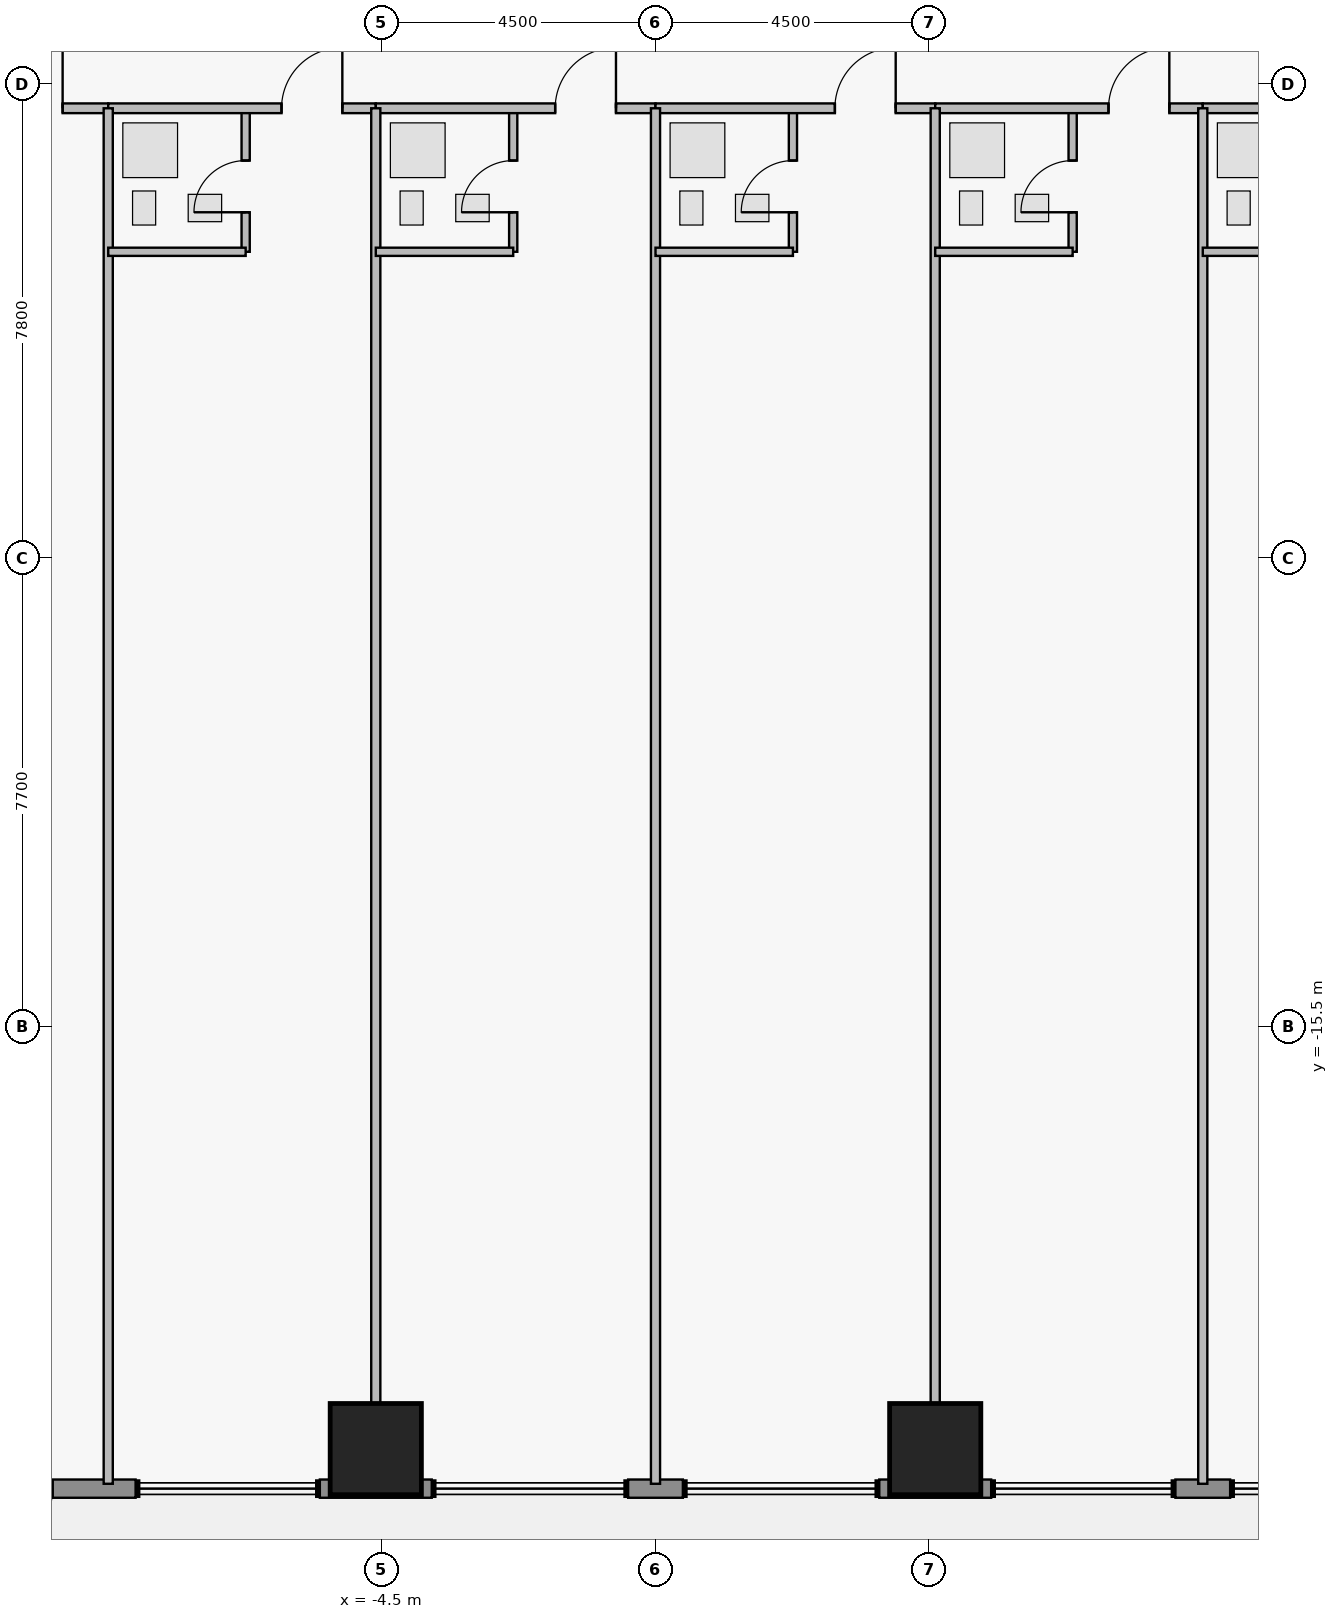
"""IFC4 building model, lengths in metres.
Left out: names, types, materials, properties, quantities, classifications, styles, units other than length and angle.
Written with IfcOpenShell. Run it as: python <this file> out.ifc"""

import sys

from ifc_helpers import new_model, si_unit, direction, frame, frame_2d, origin, origin_2d, place, context, subcontext, project, spatial, rectangle, extrude, element, fill, save


model = new_model("IFC4")
c1 = context("Model", 3, precision=1e-05, world=origin(), true_north=direction((0.0, 1.0)))
c2 = subcontext(c1, "Body", "Model", "MODEL_VIEW")
j1 = project(units=[si_unit("LENGTHUNIT", "METRE"), si_unit("PLANEANGLEUNIT", "RADIAN")], contexts=[c1])
p1 = place(None, origin())
s1 = spatial("IfcSite", under=j1, at=p1, CompositionType="ELEMENT")
p2 = place(p1, origin())
s2 = spatial("IfcBuilding", under=s1, at=p2, CompositionType="ELEMENT")
p3 = place(p2, frame((0.0, 0.0, 60.45)))
s3 = spatial("IfcBuildingStorey", under=s2, at=p3, CompositionType="ELEMENT", Elevation=60.45)
for number, where, z_axis, x_axis in (
    (1, (-4.6, -22.45, 0.0), (0.0, 0.0, 1.0), (1.0, 0.0, 0.0)),
    (2, (4.6, -22.45, 0.0), (0.0, 0.0, 1.0), (1.0, 0.0, 0.0)),
):
    element("IfcColumn", number, at=place(p3, frame(where, z_axis=z_axis, x_axis=x_axis)), inside=s3, PredefinedType="COLUMN", context=c2, shape_type="SweptSolid", body=[
        extrude(rectangle(XDim=1.5, YDim=1.5, at=origin_2d()), origin(), (0.0, 0.0, 1.0), 3.65),
    ])
p4 = place(p3, frame((9.45, -23.1, 0.0), z_axis=(0.0, 0.0, 1.0), x_axis=(-1.0, 0.0, 0.0)))
e3 = element("IfcWall", 3, at=p4, inside=s3, PredefinedType="STANDARD", context=c2, shape_type="SweptSolid", body=[
    extrude(rectangle(XDim=0.9, YDim=0.3, at=frame_2d((0.45, 0.0))), origin(), (0.0, 0.0, 1.0), 3.43),
])
p5 = place(p3, frame((5.52, -23.1, 0.0), z_axis=(0.0, 0.0, 1.0), x_axis=(-1.0, 0.0, 0.0)))
e4 = element("IfcWall", 4, at=p5, inside=s3, PredefinedType="STANDARD", context=c2, shape_type="SweptSolid", body=[
    extrude(rectangle(XDim=1.84, YDim=0.3, at=frame_2d((0.92, 0.0))), origin(), (0.0, 0.0, 1.0), 3.43),
])
p6 = place(p3, frame((0.45, -23.1, 0.0), z_axis=(0.0, 0.0, 1.0), x_axis=(-1.0, 0.0, 0.0)))
e5 = element("IfcWall", 5, at=p6, inside=s3, PredefinedType="STANDARD", context=c2, shape_type="SweptSolid", body=[
    extrude(rectangle(XDim=0.9, YDim=0.3, at=frame_2d((0.45, 0.0))), origin(), (0.0, 0.0, 1.0), 3.43),
])
p7 = place(p3, frame((-3.68, -23.1, 0.0), z_axis=(0.0, 0.0, 1.0), x_axis=(-1.0, 0.0, 0.0)))
e6 = element("IfcWall", 6, at=p7, inside=s3, PredefinedType="STANDARD", context=c2, shape_type="SweptSolid", body=[
    extrude(rectangle(XDim=1.84, YDim=0.3, at=frame_2d((0.92, 0.0))), origin(), (0.0, 0.0, 1.0), 3.43),
])
p8 = place(p3, frame((-8.55, -23.1, 0.0), z_axis=(0.0, 0.0, 1.0), x_axis=(-1.0, 0.0, 0.0)))
e7 = element("IfcWall", 7, at=p8, inside=s3, PredefinedType="STANDARD", context=c2, shape_type="SweptSolid", body=[
    extrude(rectangle(XDim=6.17, YDim=0.3, at=frame_2d((3.085, 0.0))), origin(), (0.0, 0.0, 1.0), 3.43),
])
p9 = place(p8, frame((1.365, 0.0, 0.0)))
e8 = element("IfcOpeningElement", 8, at=p9, cuts=e7, PredefinedType="OPENING", context=c2, shape_type="SweptSolid", body=[
    extrude(rectangle(XDim=1.05, YDim=2.2, at=frame_2d((0.525, 1.1))), frame((0.0, 0.16, 0.0), z_axis=(0.0, -1.0, 0.0), x_axis=(1.0, 0.0, 0.0)), (0.0, 0.0, 1.0), 0.32),
])
p10 = place(p8, frame((3.032, 0.0, 0.95)))
e9 = element("IfcOpeningElement", 9, at=p10, cuts=e7, PredefinedType="OPENING", context=c2, shape_type="SweptSolid", body=[
    extrude(rectangle(XDim=1.15, YDim=1.55, at=frame_2d((0.575, 0.775))), frame((0.0, 0.16, 0.0), z_axis=(0.0, -1.0, 0.0), x_axis=(1.0, 0.0, 0.0)), (0.0, 0.0, 1.0), 0.32),
])
p11 = place(p3, frame((-13.8, -0.4, 0.0), z_axis=(0.0, 0.0, 1.0), x_axis=(1.0, 0.0, 0.0)))
e10 = element("IfcWall", 10, at=p11, inside=s3, PredefinedType="PARTITIONING", context=c2, shape_type="SweptSolid", body=[
    extrude(rectangle(XDim=4.8, YDim=0.16, at=frame_2d((2.4, 0.0))), origin(), (0.0, 0.0, 1.0), 3.43),
])
p12 = place(p11, frame((3.05, 0.0, 0.0)))
e11 = element("IfcOpeningElement", 11, at=p12, cuts=e10, PredefinedType="OPENING", context=c2, shape_type="SweptSolid", body=[
    extrude(rectangle(XDim=1.0, YDim=2.15, at=frame_2d((0.5, 1.075))), frame((0.0, 0.09, 0.0), z_axis=(0.0, -1.0, 0.0), x_axis=(1.0, 0.0, 0.0)), (0.0, 0.0, 1.0), 0.18),
])
p13 = place(p3, frame((-6.74, -2.76, 0.0), z_axis=(0.0, 0.0, 1.0), x_axis=(0.0, 1.0, 0.0)))
e12 = element("IfcWall", 12, at=p13, inside=s3, PredefinedType="PLUMBINGWALL", context=c2, shape_type="SweptSolid", body=[
    extrude(rectangle(XDim=2.36, YDim=0.135, at=frame_2d((1.18, 0.0))), origin(), (0.0, 0.0, 1.0), 3.43),
])
p14 = place(p13, frame((0.65, 0.0, 0.0)))
e13 = element("IfcOpeningElement", 13, at=p14, cuts=e12, PredefinedType="OPENING", context=c2, shape_type="SweptSolid", body=[
    extrude(rectangle(XDim=0.85, YDim=2.1, at=frame_2d((0.425, 1.05))), frame((0.0, 0.077, 0.0), z_axis=(0.0, -1.0, 0.0), x_axis=(1.0, 0.0, 0.0)), (0.0, 0.0, 1.0), 0.155),
])
p15 = place(p3, frame((-9.0, -0.4, 0.0), z_axis=(0.0, 0.0, 1.0), x_axis=(1.0, 0.0, 0.0)))
e14 = element("IfcWall", 14, at=p15, inside=s3, PredefinedType="PARTITIONING", context=c2, shape_type="SweptSolid", body=[
    extrude(rectangle(XDim=4.4, YDim=0.16, at=frame_2d((2.2, 0.0))), origin(), (0.0, 0.0, 1.0), 3.43),
])
p16 = place(p15, frame((2.85, 0.0, 0.0)))
e15 = element("IfcOpeningElement", 15, at=p16, cuts=e14, PredefinedType="OPENING", context=c2, shape_type="SweptSolid", body=[
    extrude(rectangle(XDim=1.0, YDim=2.15, at=frame_2d((0.5, 1.075))), frame((0.0, 0.09, 0.0), z_axis=(0.0, -1.0, 0.0), x_axis=(1.0, 0.0, 0.0)), (0.0, 0.0, 1.0), 0.18),
])
p17 = place(p3, frame((-2.34, -2.76, 0.0), z_axis=(0.0, 0.0, 1.0), x_axis=(0.0, 1.0, 0.0)))
e16 = element("IfcWall", 16, at=p17, inside=s3, PredefinedType="PLUMBINGWALL", context=c2, shape_type="SweptSolid", body=[
    extrude(rectangle(XDim=2.36, YDim=0.135, at=frame_2d((1.18, 0.0))), origin(), (0.0, 0.0, 1.0), 3.43),
])
p18 = place(p17, frame((0.65, 0.0, 0.0)))
e17 = element("IfcOpeningElement", 17, at=p18, cuts=e16, PredefinedType="OPENING", context=c2, shape_type="SweptSolid", body=[
    extrude(rectangle(XDim=0.85, YDim=2.1, at=frame_2d((0.425, 1.05))), frame((0.0, 0.077, 0.0), z_axis=(0.0, -1.0, 0.0), x_axis=(1.0, 0.0, 0.0)), (0.0, 0.0, 1.0), 0.155),
])
p19 = place(p3, frame((-4.6, -0.4, 0.0), z_axis=(0.0, 0.0, 1.0), x_axis=(1.0, 0.0, 0.0)))
e18 = element("IfcWall", 18, at=p19, inside=s3, PredefinedType="PARTITIONING", context=c2, shape_type="SweptSolid", body=[
    extrude(rectangle(XDim=4.6, YDim=0.16, at=frame_2d((2.3, 0.0))), origin(), (0.0, 0.0, 1.0), 3.43),
])
p20 = place(p19, frame((2.95, 0.0, 0.0)))
e19 = element("IfcOpeningElement", 19, at=p20, cuts=e18, PredefinedType="OPENING", context=c2, shape_type="SweptSolid", body=[
    extrude(rectangle(XDim=1.0, YDim=2.15, at=frame_2d((0.5, 1.075))), frame((0.0, 0.09, 0.0), z_axis=(0.0, -1.0, 0.0), x_axis=(1.0, 0.0, 0.0)), (0.0, 0.0, 1.0), 0.18),
])
p21 = place(p3, frame((2.26, -2.76, 0.0), z_axis=(0.0, 0.0, 1.0), x_axis=(0.0, 1.0, 0.0)))
e20 = element("IfcWall", 20, at=p21, inside=s3, PredefinedType="PLUMBINGWALL", context=c2, shape_type="SweptSolid", body=[
    extrude(rectangle(XDim=2.36, YDim=0.135, at=frame_2d((1.18, 0.0))), origin(), (0.0, 0.0, 1.0), 3.43),
])
p22 = place(p21, frame((0.65, 0.0, 0.0)))
e21 = element("IfcOpeningElement", 21, at=p22, cuts=e20, PredefinedType="OPENING", context=c2, shape_type="SweptSolid", body=[
    extrude(rectangle(XDim=0.85, YDim=2.1, at=frame_2d((0.425, 1.05))), frame((0.0, 0.077, 0.0), z_axis=(0.0, -1.0, 0.0), x_axis=(1.0, 0.0, 0.0)), (0.0, 0.0, 1.0), 0.155),
])
p23 = place(p3, frame((0.0, -0.4, 0.0), z_axis=(0.0, 0.0, 1.0), x_axis=(1.0, 0.0, 0.0)))
e22 = element("IfcWall", 22, at=p23, inside=s3, PredefinedType="PARTITIONING", context=c2, shape_type="SweptSolid", body=[
    extrude(rectangle(XDim=4.6, YDim=0.16, at=frame_2d((2.3, 0.0))), origin(), (0.0, 0.0, 1.0), 3.43),
])
p24 = place(p23, frame((2.95, 0.0, 0.0)))
e23 = element("IfcOpeningElement", 23, at=p24, cuts=e22, PredefinedType="OPENING", context=c2, shape_type="SweptSolid", body=[
    extrude(rectangle(XDim=1.0, YDim=2.15, at=frame_2d((0.5, 1.075))), frame((0.0, 0.09, 0.0), z_axis=(0.0, -1.0, 0.0), x_axis=(1.0, 0.0, 0.0)), (0.0, 0.0, 1.0), 0.18),
])
p25 = place(p3, frame((6.86, -2.76, 0.0), z_axis=(0.0, 0.0, 1.0), x_axis=(0.0, 1.0, 0.0)))
e24 = element("IfcWall", 24, at=p25, inside=s3, PredefinedType="PLUMBINGWALL", context=c2, shape_type="SweptSolid", body=[
    extrude(rectangle(XDim=2.36, YDim=0.135, at=frame_2d((1.18, 0.0))), origin(), (0.0, 0.0, 1.0), 3.43),
])
p26 = place(p25, frame((0.65, 0.0, 0.0)))
e25 = element("IfcOpeningElement", 25, at=p26, cuts=e24, PredefinedType="OPENING", context=c2, shape_type="SweptSolid", body=[
    extrude(rectangle(XDim=0.85, YDim=2.1, at=frame_2d((0.425, 1.05))), frame((0.0, 0.077, 0.0), z_axis=(0.0, -1.0, 0.0), x_axis=(1.0, 0.0, 0.0)), (0.0, 0.0, 1.0), 0.155),
])
p27 = place(p3, frame((4.6, -0.4, 0.0), z_axis=(0.0, 0.0, 1.0), x_axis=(1.0, 0.0, 0.0)))
e26 = element("IfcWall", 26, at=p27, inside=s3, PredefinedType="PARTITIONING", context=c2, shape_type="SweptSolid", body=[
    extrude(rectangle(XDim=4.4, YDim=0.16, at=frame_2d((2.2, 0.0))), origin(), (0.0, 0.0, 1.0), 3.43),
])
p28 = place(p27, frame((2.85, 0.0, 0.0)))
e27 = element("IfcOpeningElement", 27, at=p28, cuts=e26, PredefinedType="OPENING", context=c2, shape_type="SweptSolid", body=[
    extrude(rectangle(XDim=1.0, YDim=2.15, at=frame_2d((0.5, 1.075))), frame((0.0, 0.09, 0.0), z_axis=(0.0, -1.0, 0.0), x_axis=(1.0, 0.0, 0.0)), (0.0, 0.0, 1.0), 0.18),
])
p29 = place(p3, frame((9.0, -0.4, 0.0), z_axis=(0.0, 0.0, 1.0), x_axis=(1.0, 0.0, 0.0)))
e28 = element("IfcWall", 28, at=p29, inside=s3, PredefinedType="PARTITIONING", context=c2, shape_type="SweptSolid", body=[
    extrude(rectangle(XDim=4.8, YDim=0.16, at=frame_2d((2.4, 0.0))), origin(), (0.0, 0.0, 1.0), 3.43),
])
p30 = place(p29, frame((3.05, 0.0, 0.0)))
e29 = element("IfcOpeningElement", 29, at=p30, cuts=e28, PredefinedType="OPENING", context=c2, shape_type="SweptSolid", body=[
    extrude(rectangle(XDim=1.0, YDim=2.15, at=frame_2d((0.5, 1.075))), frame((0.0, 0.09, 0.0), z_axis=(0.0, -1.0, 0.0), x_axis=(1.0, 0.0, 0.0)), (0.0, 0.0, 1.0), 0.18),
])
p31 = place(p3, frame((-9.0, -23.02, 0.0), z_axis=(0.0, 0.0, 1.0), x_axis=(0.0, 1.0, 0.0)))
e30 = element("IfcWall", 30, at=p31, inside=s3, PredefinedType="PARTITIONING", context=c2, shape_type="SweptSolid", body=[
    extrude(rectangle(XDim=22.62, YDim=0.15, at=frame_2d((11.31, 0.0))), origin(), (0.0, 0.0, 1.0), 3.43),
])
p32 = place(p3, frame((-9.0, -2.76, 0.0), z_axis=(0.0, 0.0, 1.0), x_axis=(1.0, 0.0, 0.0)))
e31 = element("IfcWall", 31, at=p32, inside=s3, PredefinedType="PLUMBINGWALL", context=c2, shape_type="SweptSolid", body=[
    extrude(rectangle(XDim=2.26, YDim=0.135, at=frame_2d((1.13, 0.0))), origin(), (0.0, 0.0, 1.0), 3.43),
])
p33 = place(p3, frame((-4.6, -23.02, 0.0), z_axis=(0.0, 0.0, 1.0), x_axis=(0.0, 1.0, 0.0)))
e32 = element("IfcWall", 32, at=p33, inside=s3, PredefinedType="PARTITIONING", context=c2, shape_type="SweptSolid", body=[
    extrude(rectangle(XDim=22.62, YDim=0.15, at=frame_2d((11.31, 0.0))), origin(), (0.0, 0.0, 1.0), 2.668),
])
p34 = place(p3, frame((-4.6, -2.76, 0.0), z_axis=(0.0, 0.0, 1.0), x_axis=(1.0, 0.0, 0.0)))
e33 = element("IfcWall", 33, at=p34, inside=s3, PredefinedType="PLUMBINGWALL", context=c2, shape_type="SweptSolid", body=[
    extrude(rectangle(XDim=2.26, YDim=0.135, at=frame_2d((1.13, 0.0))), origin(), (0.0, 0.0, 1.0), 3.43),
])
p35 = place(p3, frame((0.0, -23.02, 0.0), z_axis=(0.0, 0.0, 1.0), x_axis=(0.0, 1.0, 0.0)))
e34 = element("IfcWall", 34, at=p35, inside=s3, PredefinedType="PARTITIONING", context=c2, shape_type="SweptSolid", body=[
    extrude(rectangle(XDim=22.62, YDim=0.15, at=frame_2d((11.31, 0.0))), origin(), (0.0, 0.0, 1.0), 3.43),
])
p36 = place(p3, frame((0.0, -2.76, 0.0), z_axis=(0.0, 0.0, 1.0), x_axis=(1.0, 0.0, 0.0)))
e35 = element("IfcWall", 35, at=p36, inside=s3, PredefinedType="PLUMBINGWALL", context=c2, shape_type="SweptSolid", body=[
    extrude(rectangle(XDim=2.26, YDim=0.135, at=frame_2d((1.13, 0.0))), origin(), (0.0, 0.0, 1.0), 3.43),
])
p37 = place(p3, frame((4.6, -23.02, 0.0), z_axis=(0.0, 0.0, 1.0), x_axis=(0.0, 1.0, 0.0)))
e36 = element("IfcWall", 36, at=p37, inside=s3, PredefinedType="PARTITIONING", context=c2, shape_type="SweptSolid", body=[
    extrude(rectangle(XDim=22.62, YDim=0.15, at=frame_2d((11.31, 0.0))), origin(), (0.0, 0.0, 1.0), 2.668),
])
p38 = place(p3, frame((4.6, -2.76, 0.0), z_axis=(0.0, 0.0, 1.0), x_axis=(1.0, 0.0, 0.0)))
e37 = element("IfcWall", 37, at=p38, inside=s3, PredefinedType="PLUMBINGWALL", context=c2, shape_type="SweptSolid", body=[
    extrude(rectangle(XDim=2.26, YDim=0.135, at=frame_2d((1.13, 0.0))), origin(), (0.0, 0.0, 1.0), 3.43),
])
p39 = place(p3, frame((9.0, -23.02, 0.0), z_axis=(0.0, 0.0, 1.0), x_axis=(0.0, 1.0, 0.0)))
e38 = element("IfcWall", 38, at=p39, inside=s3, PredefinedType="PARTITIONING", context=c2, shape_type="SweptSolid", body=[
    extrude(rectangle(XDim=22.62, YDim=0.15, at=frame_2d((11.31, 0.0))), origin(), (0.0, 0.0, 1.0), 3.43),
])
p40 = place(p3, frame((9.0, -2.76, 0.0), z_axis=(0.0, 0.0, 1.0), x_axis=(1.0, 0.0, 0.0)))
e39 = element("IfcWall", 39, at=p40, inside=s3, PredefinedType="PLUMBINGWALL", context=c2, shape_type="SweptSolid", body=[
    extrude(rectangle(XDim=2.26, YDim=0.135, at=frame_2d((1.13, 0.0))), origin(), (0.0, 0.0, 1.0), 3.43),
])
p41 = place(p9, origin())
e40 = element("IfcDoor", 40, at=p41, inside=s3, OperationType="SINGLE_SWING_RIGHT", PredefinedType="DOOR", context=c2, shape_type="SweptSolid", body=[
    extrude(rectangle(XDim=1.05, YDim=2.2, at=frame_2d((0.525, 1.1))), frame((0.0, 0.025, 0.0), z_axis=(0.0, -1.0, 0.0), x_axis=(1.0, 0.0, 0.0)), (0.0, 0.0, 1.0), 0.05),
])
fill(e8, e40)
p42 = place(p12, origin())
e41 = element("IfcDoor", 41, at=p42, inside=s3, OperationType="SINGLE_SWING_RIGHT", PredefinedType="DOOR", context=c2, shape_type="SweptSolid", body=[
    extrude(rectangle(XDim=1.0, YDim=2.15, at=frame_2d((0.5, 1.075))), frame((0.0, 0.025, 0.0), z_axis=(0.0, -1.0, 0.0), x_axis=(1.0, 0.0, 0.0)), (0.0, 0.0, 1.0), 0.05),
])
fill(e11, e41)
p43 = place(p14, origin())
e42 = element("IfcDoor", 42, at=p43, inside=s3, OperationType="SINGLE_SWING_LEFT", PredefinedType="DOOR", context=c2, shape_type="SweptSolid", body=[
    extrude(rectangle(XDim=0.85, YDim=2.1, at=frame_2d((0.425, 1.05))), frame((0.0, 0.025, 0.0), z_axis=(0.0, -1.0, 0.0), x_axis=(1.0, 0.0, 0.0)), (0.0, 0.0, 1.0), 0.05),
])
fill(e13, e42)
p44 = place(p16, origin())
e43 = element("IfcDoor", 43, at=p44, inside=s3, OperationType="SINGLE_SWING_RIGHT", PredefinedType="DOOR", context=c2, shape_type="SweptSolid", body=[
    extrude(rectangle(XDim=1.0, YDim=2.15, at=frame_2d((0.5, 1.075))), frame((0.0, 0.025, 0.0), z_axis=(0.0, -1.0, 0.0), x_axis=(1.0, 0.0, 0.0)), (0.0, 0.0, 1.0), 0.05),
])
fill(e15, e43)
p45 = place(p18, origin())
e44 = element("IfcDoor", 44, at=p45, inside=s3, OperationType="SINGLE_SWING_LEFT", PredefinedType="DOOR", context=c2, shape_type="SweptSolid", body=[
    extrude(rectangle(XDim=0.85, YDim=2.1, at=frame_2d((0.425, 1.05))), frame((0.0, 0.025, 0.0), z_axis=(0.0, -1.0, 0.0), x_axis=(1.0, 0.0, 0.0)), (0.0, 0.0, 1.0), 0.05),
])
fill(e17, e44)
p46 = place(p20, origin())
e45 = element("IfcDoor", 45, at=p46, inside=s3, OperationType="SINGLE_SWING_RIGHT", PredefinedType="DOOR", context=c2, shape_type="SweptSolid", body=[
    extrude(rectangle(XDim=1.0, YDim=2.15, at=frame_2d((0.5, 1.075))), frame((0.0, 0.025, 0.0), z_axis=(0.0, -1.0, 0.0), x_axis=(1.0, 0.0, 0.0)), (0.0, 0.0, 1.0), 0.05),
])
fill(e19, e45)
p47 = place(p22, origin())
e46 = element("IfcDoor", 46, at=p47, inside=s3, OperationType="SINGLE_SWING_LEFT", PredefinedType="DOOR", context=c2, shape_type="SweptSolid", body=[
    extrude(rectangle(XDim=0.85, YDim=2.1, at=frame_2d((0.425, 1.05))), frame((0.0, 0.025, 0.0), z_axis=(0.0, -1.0, 0.0), x_axis=(1.0, 0.0, 0.0)), (0.0, 0.0, 1.0), 0.05),
])
fill(e21, e46)
p48 = place(p24, origin())
e47 = element("IfcDoor", 47, at=p48, inside=s3, OperationType="SINGLE_SWING_RIGHT", PredefinedType="DOOR", context=c2, shape_type="SweptSolid", body=[
    extrude(rectangle(XDim=1.0, YDim=2.15, at=frame_2d((0.5, 1.075))), frame((0.0, 0.025, 0.0), z_axis=(0.0, -1.0, 0.0), x_axis=(1.0, 0.0, 0.0)), (0.0, 0.0, 1.0), 0.05),
])
fill(e23, e47)
p49 = place(p26, origin())
e48 = element("IfcDoor", 48, at=p49, inside=s3, OperationType="SINGLE_SWING_LEFT", PredefinedType="DOOR", context=c2, shape_type="SweptSolid", body=[
    extrude(rectangle(XDim=0.85, YDim=2.1, at=frame_2d((0.425, 1.05))), frame((0.0, 0.025, 0.0), z_axis=(0.0, -1.0, 0.0), x_axis=(1.0, 0.0, 0.0)), (0.0, 0.0, 1.0), 0.05),
])
fill(e25, e48)
p50 = place(p28, origin())
e49 = element("IfcDoor", 49, at=p50, inside=s3, OperationType="SINGLE_SWING_RIGHT", PredefinedType="DOOR", context=c2, shape_type="SweptSolid", body=[
    extrude(rectangle(XDim=1.0, YDim=2.15, at=frame_2d((0.5, 1.075))), frame((0.0, 0.025, 0.0), z_axis=(0.0, -1.0, 0.0), x_axis=(1.0, 0.0, 0.0)), (0.0, 0.0, 1.0), 0.05),
])
fill(e27, e49)
save(model, sys.argv[1])
